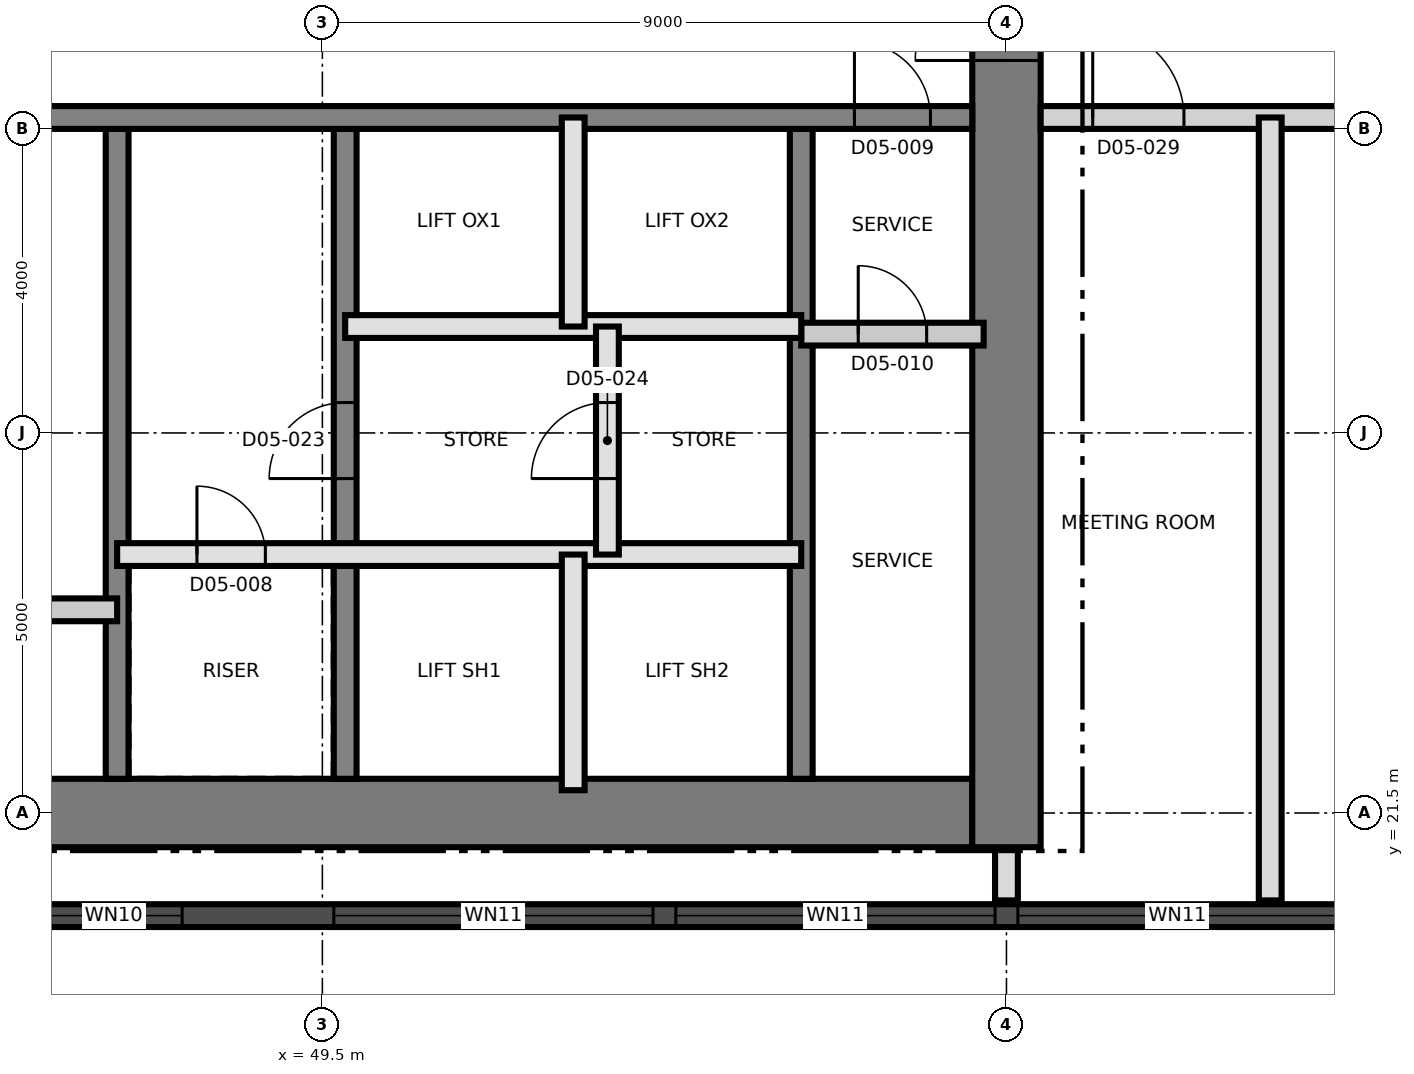
"""IFC4 building model, lengths in metres.
Left out: names, types, materials, properties, quantities, classifications, styles, units other than length and angle.
Written with IfcOpenShell. Run it as: python <this file> out.ifc"""

import sys

from ifc_helpers import new_model, si_unit, direction, frame, frame_2d, origin, place, context, subcontext, project, spatial, rectangle, extrude, element, fill, save


model = new_model("IFC4")
c1 = context("Model", 3, precision=1e-05, world=origin(), true_north=direction((0.0, 1.0)))
c2 = subcontext(c1, "Body", "Model", "MODEL_VIEW")
j1 = project(units=[si_unit("LENGTHUNIT", "METRE"), si_unit("PLANEANGLEUNIT", "RADIAN")], contexts=[c1])
p1 = place(None, origin())
s1 = spatial("IfcSite", under=j1, at=p1, CompositionType="ELEMENT")
p2 = place(p1, origin())
s2 = spatial("IfcBuilding", under=s1, at=p2, CompositionType="ELEMENT")
p3 = place(p2, frame((0.0, 0.0, 70.5)))
s3 = spatial("IfcBuildingStorey", under=s2, at=p3, CompositionType="ELEMENT", Elevation=70.5)
p4 = place(p3, frame((31.05, 21.5, 0.0), z_axis=(0.0, 0.0, 1.0), x_axis=(1.0, 0.0, 0.0)))
e1 = element("IfcWall", 1, at=p4, inside=s3, PredefinedType="SHEAR", context=c2, shape_type="SweptSolid", body=[
    extrude(rectangle(XDim=27.0, YDim=0.9, at=frame_2d((13.5, 0.0))), origin(), (0.0, 0.0, 1.0), 3.7),
])
p5 = place(p3, frame((58.5, 21.05, 0.0), z_axis=(0.0, 0.0, 1.0), x_axis=(0.0, 1.0, 0.0)))
e2 = element("IfcWall", 2, at=p5, inside=s3, PredefinedType="SHEAR", context=c2, shape_type="SweptSolid", body=[
    extrude(rectangle(XDim=18.9, YDim=0.9, at=frame_2d((9.45, 0.0))), origin(), (0.0, 0.0, 1.0), 3.7),
])
p6 = place(p5, frame((10.35, 0.0, 0.0)))
e3 = element("IfcOpeningElement", 3, at=p6, cuts=e2, PredefinedType="OPENING", context=c2, shape_type="SweptSolid", body=[
    extrude(rectangle(XDim=1.2, YDim=2.1, at=frame_2d((0.6, 1.05))), frame((0.0, 0.46, 0.0), z_axis=(0.0, -1.0, 0.0), x_axis=(1.0, 0.0, 0.0)), (0.0, 0.0, 1.0), 0.92),
])
p7 = place(p3, frame((46.8, 21.95, 0.0), z_axis=(0.0, 0.0, 1.0), x_axis=(0.0, 1.0, 0.0)))
e4 = element("IfcWall", 4, at=p7, inside=s3, PredefinedType="SHEAR", context=c2, shape_type="SweptSolid", body=[
    extrude(rectangle(XDim=8.55, YDim=0.3, at=frame_2d((4.275, 0.0))), origin(), (0.0, 0.0, 1.0), 3.7),
])
p8 = place(p3, frame((49.8, 21.95, 0.0), z_axis=(0.0, 0.0, 1.0), x_axis=(0.0, 1.0, 0.0)))
e5 = element("IfcWall", 5, at=p8, inside=s3, PredefinedType="SHEAR", context=c2, shape_type="SweptSolid", body=[
    extrude(rectangle(XDim=8.55, YDim=0.3, at=frame_2d((4.275, 0.0))), origin(), (0.0, 0.0, 1.0), 3.7),
])
p9 = place(p8, frame((3.95, 0.0, 0.0)))
e6 = element("IfcOpeningElement", 6, at=p9, cuts=e5, PredefinedType="OPENING", context=c2, shape_type="SweptSolid", body=[
    extrude(rectangle(XDim=1.0, YDim=2.1, at=frame_2d((0.5, 1.05))), frame((0.0, 0.16, 0.0), z_axis=(0.0, -1.0, 0.0), x_axis=(1.0, 0.0, 0.0)), (0.0, 0.0, 1.0), 0.32),
])
p10 = place(p3, frame((55.8, 21.95, 0.0), z_axis=(0.0, 0.0, 1.0), x_axis=(0.0, 1.0, 0.0)))
e7 = element("IfcWall", 7, at=p10, inside=s3, PredefinedType="SHEAR", context=c2, shape_type="SweptSolid", body=[
    extrude(rectangle(XDim=8.55, YDim=0.3, at=frame_2d((4.275, 0.0))), origin(), (0.0, 0.0, 1.0), 3.7),
])
p11 = place(p3, frame((31.95, 30.65, 0.0), z_axis=(0.0, 0.0, 1.0), x_axis=(1.0, 0.0, 0.0)))
e8 = element("IfcWall", 8, at=p11, inside=s3, PredefinedType="SHEAR", context=c2, shape_type="SweptSolid", body=[
    extrude(rectangle(XDim=26.1, YDim=0.3, at=frame_2d((13.05, 0.0))), origin(), (0.0, 0.0, 1.0), 3.7),
])
p12 = place(p11, frame((24.55, 0.0, 0.0)))
e9 = element("IfcOpeningElement", 9, at=p12, cuts=e8, PredefinedType="OPENING", context=c2, shape_type="SweptSolid", body=[
    extrude(rectangle(XDim=1.0, YDim=2.1, at=frame_2d((0.5, 1.05))), frame((0.0, 0.16, 0.0), z_axis=(0.0, -1.0, 0.0), x_axis=(1.0, 0.0, 0.0)), (0.0, 0.0, 1.0), 0.32),
])
p13 = place(p11, frame((11.35, 0.0, 0.0)))
e10 = element("IfcOpeningElement", 10, at=p13, cuts=e8, PredefinedType="OPENING", context=c2, shape_type="SweptSolid", body=[
    extrude(rectangle(XDim=1.0, YDim=2.1, at=frame_2d((0.5, 1.05))), frame((0.0, 0.16, 0.0), z_axis=(0.0, -1.0, 0.0), x_axis=(1.0, 0.0, 0.0)), (0.0, 0.0, 1.0), 0.32),
])
p14 = place(p3, frame((44.011, 20.15, 0.0), z_axis=(0.0, 0.0, 1.0), x_axis=(1.0, 0.0, 0.0)))
e11 = element("IfcWall", 11, at=p14, inside=s3, PredefinedType="SOLIDWALL", context=c2, shape_type="SweptSolid", body=[
    extrude(rectangle(XDim=43.476, YDim=0.3, at=frame_2d((21.738, 0.0))), origin(), (0.0, 0.0, 1.0), 3.4),
])
p15 = place(p14, frame((1.845, 0.0, 0.3)))
e12 = element("IfcOpeningElement", 12, at=p15, cuts=e11, PredefinedType="OPENING", context=c2, shape_type="SweptSolid", body=[
    extrude(rectangle(XDim=1.8, YDim=2.4, at=frame_2d((0.9, 1.2))), frame((0.0, 0.16, 0.0), z_axis=(0.0, -1.0, 0.0), x_axis=(1.0, 0.0, 0.0)), (0.0, 0.0, 1.0), 0.32),
])
p16 = place(p14, frame((5.639, 0.0, 0.9)))
e13 = element("IfcOpeningElement", 13, at=p16, cuts=e11, PredefinedType="OPENING", context=c2, shape_type="SweptSolid", body=[
    extrude(rectangle(XDim=4.2, YDim=1.5, at=frame_2d((2.1, 0.75))), frame((0.0, 0.16, 0.0), z_axis=(0.0, -1.0, 0.0), x_axis=(1.0, 0.0, 0.0)), (0.0, 0.0, 1.0), 0.32),
])
p17 = place(p14, frame((10.139, 0.0, 0.9)))
e14 = element("IfcOpeningElement", 14, at=p17, cuts=e11, PredefinedType="OPENING", context=c2, shape_type="SweptSolid", body=[
    extrude(rectangle(XDim=4.2, YDim=1.5, at=frame_2d((2.1, 0.75))), frame((0.0, 0.16, 0.0), z_axis=(0.0, -1.0, 0.0), x_axis=(1.0, 0.0, 0.0)), (0.0, 0.0, 1.0), 0.32),
])
p18 = place(p14, frame((14.639, 0.0, 0.9)))
e15 = element("IfcOpeningElement", 15, at=p18, cuts=e11, PredefinedType="OPENING", context=c2, shape_type="SweptSolid", body=[
    extrude(rectangle(XDim=4.2, YDim=1.5, at=frame_2d((2.1, 0.75))), frame((0.0, 0.16, 0.0), z_axis=(0.0, -1.0, 0.0), x_axis=(1.0, 0.0, 0.0)), (0.0, 0.0, 1.0), 0.32),
])
p19 = place(p14, frame((19.139, 0.0, 0.9)))
e16 = element("IfcOpeningElement", 16, at=p19, cuts=e11, PredefinedType="OPENING", context=c2, shape_type="SweptSolid", body=[
    extrude(rectangle(XDim=4.2, YDim=1.5, at=frame_2d((2.1, 0.75))), frame((0.0, 0.16, 0.0), z_axis=(0.0, -1.0, 0.0), x_axis=(1.0, 0.0, 0.0)), (0.0, 0.0, 1.0), 0.32),
])
p20 = place(p14, frame((23.639, 0.0, 0.9)))
e17 = element("IfcOpeningElement", 17, at=p20, cuts=e11, PredefinedType="OPENING", context=c2, shape_type="SweptSolid", body=[
    extrude(rectangle(XDim=4.2, YDim=1.5, at=frame_2d((2.1, 0.75))), frame((0.0, 0.16, 0.0), z_axis=(0.0, -1.0, 0.0), x_axis=(1.0, 0.0, 0.0)), (0.0, 0.0, 1.0), 0.32),
])
p21 = place(p14, frame((28.139, 0.0, 0.9)))
e18 = element("IfcOpeningElement", 18, at=p21, cuts=e11, PredefinedType="OPENING", context=c2, shape_type="SweptSolid", body=[
    extrude(rectangle(XDim=4.2, YDim=1.5, at=frame_2d((2.1, 0.75))), frame((0.0, 0.16, 0.0), z_axis=(0.0, -1.0, 0.0), x_axis=(1.0, 0.0, 0.0)), (0.0, 0.0, 1.0), 0.32),
])
p22 = place(p14, frame((32.639, 0.0, 0.9)))
e19 = element("IfcOpeningElement", 19, at=p22, cuts=e11, PredefinedType="OPENING", context=c2, shape_type="SweptSolid", body=[
    extrude(rectangle(XDim=4.2, YDim=1.5, at=frame_2d((2.1, 0.75))), frame((0.0, 0.16, 0.0), z_axis=(0.0, -1.0, 0.0), x_axis=(1.0, 0.0, 0.0)), (0.0, 0.0, 1.0), 0.32),
])
p23 = place(p14, frame((37.139, 0.0, 0.9)))
e20 = element("IfcOpeningElement", 20, at=p23, cuts=e11, PredefinedType="OPENING", context=c2, shape_type="SweptSolid", body=[
    extrude(rectangle(XDim=4.2, YDim=1.5, at=frame_2d((2.1, 0.75))), frame((0.0, 0.16, 0.0), z_axis=(0.0, -1.0, 0.0), x_axis=(1.0, 0.0, 0.0)), (0.0, 0.0, 1.0), 0.32),
])
p24 = place(p3, frame((40.8, 24.173, 0.0), z_axis=(0.0, 0.0, 1.0), x_axis=(1.0, 0.0, 0.0)))
e21 = element("IfcWall", 21, at=p24, inside=s3, PredefinedType="PARTITIONING", context=c2, shape_type="SweptSolid", body=[
    extrude(rectangle(XDim=6.0, YDim=0.3, at=frame_2d((3.0, 0.0))), origin(), (0.0, 0.0, 1.0), 3.4),
])
p25 = place(p24, frame((2.5, 0.0, 0.0)))
e22 = element("IfcOpeningElement", 22, at=p25, cuts=e21, PredefinedType="OPENING", context=c2, shape_type="SweptSolid", body=[
    extrude(rectangle(XDim=1.0, YDim=2.1, at=frame_2d((0.5, 1.05))), frame((0.0, 0.16, 0.0), z_axis=(0.0, -1.0, 0.0), x_axis=(1.0, 0.0, 0.0)), (0.0, 0.0, 1.0), 0.32),
])
p26 = place(p3, frame((46.8, 24.9, 0.0), z_axis=(0.0, 0.0, 1.0), x_axis=(1.0, 0.0, 0.0)))
e23 = element("IfcWall", 23, at=p26, inside=s3, PredefinedType="SOLIDWALL", context=c2, shape_type="SweptSolid", body=[
    extrude(rectangle(XDim=9.0, YDim=0.3, at=frame_2d((4.5, 0.0))), origin(), (0.0, 0.0, 1.0), 3.4),
])
p27 = place(p26, frame((1.05, 0.0, 0.0)))
e24 = element("IfcOpeningElement", 24, at=p27, cuts=e23, PredefinedType="OPENING", context=c2, shape_type="SweptSolid", body=[
    extrude(rectangle(XDim=0.9, YDim=2.1, at=frame_2d((0.45, 1.05))), frame((0.0, 0.16, 0.0), z_axis=(0.0, -1.0, 0.0), x_axis=(1.0, 0.0, 0.0)), (0.0, 0.0, 1.0), 0.32),
])
p28 = place(p3, frame((55.8, 27.8, 0.0), z_axis=(0.0, 0.0, 1.0), x_axis=(1.0, 0.0, 0.0)))
e25 = element("IfcWall", 25, at=p28, inside=s3, PredefinedType="PARTITIONING", context=c2, shape_type="SweptSolid", body=[
    extrude(rectangle(XDim=2.4, YDim=0.3, at=frame_2d((1.2, 0.0))), origin(), (0.0, 0.0, 1.0), 3.4),
])
p29 = place(p28, frame((0.75, 0.0, 0.0)))
e26 = element("IfcOpeningElement", 26, at=p29, cuts=e25, PredefinedType="OPENING", context=c2, shape_type="SweptSolid", body=[
    extrude(rectangle(XDim=0.9, YDim=2.1, at=frame_2d((0.45, 1.05))), frame((0.0, 0.16, 0.0), z_axis=(0.0, -1.0, 0.0), x_axis=(1.0, 0.0, 0.0)), (0.0, 0.0, 1.0), 0.32),
])
p30 = place(p3, frame((49.8, 27.9, 0.0), z_axis=(0.0, 0.0, 1.0), x_axis=(1.0, 0.0, 0.0)))
e27 = element("IfcWall", 27, at=p30, inside=s3, PredefinedType="SOLIDWALL", context=c2, shape_type="SweptSolid", body=[
    extrude(rectangle(XDim=6.0, YDim=0.3, at=frame_2d((3.0, 0.0))), origin(), (0.0, 0.0, 1.0), 3.4),
])
p31 = place(p3, frame((52.8, 21.8, 0.0), z_axis=(0.0, 0.0, 1.0), x_axis=(0.0, 1.0, 0.0)))
e28 = element("IfcWall", 28, at=p31, inside=s3, PredefinedType="SOLIDWALL", context=c2, shape_type="SweptSolid", body=[
    extrude(rectangle(XDim=3.1, YDim=0.3, at=frame_2d((1.55, 0.0))), origin(), (0.0, 0.0, 1.0), 3.4),
])
p32 = place(p3, frame((52.8, 27.9, 0.0), z_axis=(0.0, 0.0, 1.0), x_axis=(0.0, 1.0, 0.0)))
e29 = element("IfcWall", 29, at=p32, inside=s3, PredefinedType="SOLIDWALL", context=c2, shape_type="SweptSolid", body=[
    extrude(rectangle(XDim=2.75, YDim=0.3, at=frame_2d((1.375, 0.0))), origin(), (0.0, 0.0, 1.0), 3.4),
])
p33 = place(p3, frame((53.25, 24.9, 0.0), z_axis=(0.0, 0.0, 1.0), x_axis=(0.0, 1.0, 0.0)))
e30 = element("IfcWall", 30, at=p33, inside=s3, PredefinedType="SOLIDWALL", context=c2, shape_type="SweptSolid", body=[
    extrude(rectangle(XDim=3.0, YDim=0.3, at=frame_2d((1.5, 0.0))), origin(), (0.0, 0.0, 1.0), 3.4),
])
p34 = place(p33, frame((1.0, 0.0, 0.0)))
e31 = element("IfcOpeningElement", 31, at=p34, cuts=e30, PredefinedType="OPENING", context=c2, shape_type="SweptSolid", body=[
    extrude(rectangle(XDim=1.0, YDim=2.1, at=frame_2d((0.5, 1.05))), frame((0.0, 0.16, 0.0), z_axis=(0.0, -1.0, 0.0), x_axis=(1.0, 0.0, 0.0)), (0.0, 0.0, 1.0), 0.32),
])
p35 = place(p3, frame((58.95, 30.65, 0.0), z_axis=(0.0, 0.0, 1.0), x_axis=(1.0, 0.0, 0.0)))
e32 = element("IfcWall", 32, at=p35, inside=s3, PredefinedType="PARTITIONING", context=c2, shape_type="SweptSolid", body=[
    extrude(rectangle(XDim=26.38, YDim=0.3, at=frame_2d((13.19, 0.0))), origin(), (0.0, 0.0, 1.0), 3.4),
])
p36 = place(p35, frame((0.685, 0.0, 0.0)))
e33 = element("IfcOpeningElement", 33, at=p36, cuts=e32, PredefinedType="OPENING", context=c2, shape_type="SweptSolid", body=[
    extrude(rectangle(XDim=1.2, YDim=2.1, at=frame_2d((0.6, 1.05))), frame((0.0, 0.16, 0.0), z_axis=(0.0, -1.0, 0.0), x_axis=(1.0, 0.0, 0.0)), (0.0, 0.0, 1.0), 0.32),
])
p37 = place(p35, frame((3.935, 0.0, 0.0)))
e34 = element("IfcOpeningElement", 34, at=p37, cuts=e32, PredefinedType="OPENING", context=c2, shape_type="SweptSolid", body=[
    extrude(rectangle(XDim=1.0, YDim=2.1, at=frame_2d((0.5, 1.05))), frame((0.0, 0.16, 0.0), z_axis=(0.0, -1.0, 0.0), x_axis=(1.0, 0.0, 0.0)), (0.0, 0.0, 1.0), 0.32),
])
p38 = place(p35, frame((11.965, 0.0, 0.0)))
e35 = element("IfcOpeningElement", 35, at=p38, cuts=e32, PredefinedType="OPENING", context=c2, shape_type="SweptSolid", body=[
    extrude(rectangle(XDim=1.0, YDim=2.1, at=frame_2d((0.5, 1.05))), frame((0.0, 0.16, 0.0), z_axis=(0.0, -1.0, 0.0), x_axis=(1.0, 0.0, 0.0)), (0.0, 0.0, 1.0), 0.32),
])
p39 = place(p35, frame((14.915, 0.0, 0.0)))
e36 = element("IfcOpeningElement", 36, at=p39, cuts=e32, PredefinedType="OPENING", context=c2, shape_type="SweptSolid", body=[
    extrude(rectangle(XDim=1.4, YDim=2.1, at=frame_2d((0.7, 1.05))), frame((0.0, 0.16, 0.0), z_axis=(0.0, -1.0, 0.0), x_axis=(1.0, 0.0, 0.0)), (0.0, 0.0, 1.0), 0.32),
])
p40 = place(p35, frame((18.685, 0.0, 0.0)))
e37 = element("IfcOpeningElement", 37, at=p40, cuts=e32, PredefinedType="OPENING", context=c2, shape_type="SweptSolid", body=[
    extrude(rectangle(XDim=1.2, YDim=2.1, at=frame_2d((0.6, 1.05))), frame((0.0, 0.16, 0.0), z_axis=(0.0, -1.0, 0.0), x_axis=(1.0, 0.0, 0.0)), (0.0, 0.0, 1.0), 0.32),
])
p41 = place(p35, frame((21.935, 0.0, 0.0)))
e38 = element("IfcOpeningElement", 38, at=p41, cuts=e32, PredefinedType="OPENING", context=c2, shape_type="SweptSolid", body=[
    extrude(rectangle(XDim=1.0, YDim=2.1, at=frame_2d((0.5, 1.05))), frame((0.0, 0.16, 0.0), z_axis=(0.0, -1.0, 0.0), x_axis=(1.0, 0.0, 0.0)), (0.0, 0.0, 1.0), 0.32),
])
p42 = place(p3, frame((58.5, 20.35, 0.0), z_axis=(0.0, 0.0, 1.0), x_axis=(0.0, 1.0, 0.0)))
e39 = element("IfcWall", 39, at=p42, inside=s3, PredefinedType="PARTITIONING", context=c2, shape_type="SweptSolid", body=[
    extrude(rectangle(XDim=0.68, YDim=0.3, at=frame_2d((0.34, 0.0))), origin(), (0.0, 0.0, 1.0), 3.4),
])
p43 = place(p3, frame((61.97, 20.35, 0.0), z_axis=(0.0, 0.0, 1.0), x_axis=(0.0, 1.0, 0.0)))
e40 = element("IfcWall", 40, at=p43, inside=s3, PredefinedType="PARTITIONING", context=c2, shape_type="SweptSolid", body=[
    extrude(rectangle(XDim=10.3, YDim=0.3, at=frame_2d((5.15, 0.0))), origin(), (0.0, 0.0, 1.0), 3.4),
])
p44 = place(p15, origin())
e41 = element("IfcWindow", 41, at=p44, inside=s3, PartitioningType="SINGLE_PANEL", PredefinedType="WINDOW", context=c2, shape_type="SweptSolid", body=[
    extrude(rectangle(XDim=1.8, YDim=2.4, at=frame_2d((0.9, 1.2))), frame((0.0, 0.03, 0.0), z_axis=(0.0, -1.0, 0.0), x_axis=(1.0, 0.0, 0.0)), (0.0, 0.0, 1.0), 0.06),
])
fill(e12, e41)
p45 = place(p16, origin())
e42 = element("IfcWindow", 42, at=p45, inside=s3, PartitioningType="SINGLE_PANEL", PredefinedType="WINDOW", context=c2, shape_type="SweptSolid", body=[
    extrude(rectangle(XDim=4.2, YDim=1.5, at=frame_2d((2.1, 0.75))), frame((0.0, 0.03, 0.0), z_axis=(0.0, -1.0, 0.0), x_axis=(1.0, 0.0, 0.0)), (0.0, 0.0, 1.0), 0.06),
])
fill(e13, e42)
p46 = place(p17, origin())
e43 = element("IfcWindow", 43, at=p46, inside=s3, PartitioningType="SINGLE_PANEL", PredefinedType="WINDOW", context=c2, shape_type="SweptSolid", body=[
    extrude(rectangle(XDim=4.2, YDim=1.5, at=frame_2d((2.1, 0.75))), frame((0.0, 0.03, 0.0), z_axis=(0.0, -1.0, 0.0), x_axis=(1.0, 0.0, 0.0)), (0.0, 0.0, 1.0), 0.06),
])
fill(e14, e43)
p47 = place(p18, origin())
e44 = element("IfcWindow", 44, at=p47, inside=s3, PartitioningType="SINGLE_PANEL", PredefinedType="WINDOW", context=c2, shape_type="SweptSolid", body=[
    extrude(rectangle(XDim=4.2, YDim=1.5, at=frame_2d((2.1, 0.75))), frame((0.0, 0.03, 0.0), z_axis=(0.0, -1.0, 0.0), x_axis=(1.0, 0.0, 0.0)), (0.0, 0.0, 1.0), 0.06),
])
fill(e15, e44)
p48 = place(p27, origin())
e45 = element("IfcDoor", 45, at=p48, inside=s3, OperationType="SINGLE_SWING_RIGHT", PredefinedType="DOOR", context=c2, shape_type="SweptSolid", body=[
    extrude(rectangle(XDim=0.9, YDim=2.1, at=frame_2d((0.45, 1.05))), frame((0.0, 0.025, 0.0), z_axis=(0.0, -1.0, 0.0), x_axis=(1.0, 0.0, 0.0)), (0.0, 0.0, 1.0), 0.05),
])
fill(e24, e45)
p49 = place(p12, origin())
e46 = element("IfcDoor", 46, at=p49, inside=s3, OperationType="SINGLE_SWING_LEFT", PredefinedType="DOOR", context=c2, shape_type="SweptSolid", body=[
    extrude(rectangle(XDim=1.0, YDim=2.1, at=frame_2d((0.5, 1.05))), frame((0.0, 0.025, 0.0), z_axis=(0.0, -1.0, 0.0), x_axis=(1.0, 0.0, 0.0)), (0.0, 0.0, 1.0), 0.05),
])
fill(e9, e46)
p50 = place(p29, origin())
e47 = element("IfcDoor", 47, at=p50, inside=s3, OperationType="SINGLE_SWING_RIGHT", PredefinedType="DOOR", context=c2, shape_type="SweptSolid", body=[
    extrude(rectangle(XDim=0.9, YDim=2.1, at=frame_2d((0.45, 1.05))), frame((0.0, 0.025, 0.0), z_axis=(0.0, -1.0, 0.0), x_axis=(1.0, 0.0, 0.0)), (0.0, 0.0, 1.0), 0.05),
])
fill(e26, e47)
p51 = place(p6, origin())
e48 = element("IfcDoor", 48, at=p51, inside=s3, OperationType="SINGLE_SWING_LEFT", PredefinedType="DOOR", context=c2, shape_type="SweptSolid", body=[
    extrude(rectangle(XDim=1.2, YDim=2.1, at=frame_2d((0.6, 1.05))), frame((0.0, 0.025, 0.0), z_axis=(0.0, -1.0, 0.0), x_axis=(1.0, 0.0, 0.0)), (0.0, 0.0, 1.0), 0.05),
])
fill(e3, e48)
p52 = place(p9, origin())
e49 = element("IfcDoor", 49, at=p52, inside=s3, OperationType="SINGLE_SWING_LEFT", PredefinedType="DOOR", context=c2, shape_type="SweptSolid", body=[
    extrude(rectangle(XDim=1.0, YDim=2.1, at=frame_2d((0.5, 1.05))), frame((0.0, 0.025, 0.0), z_axis=(0.0, -1.0, 0.0), x_axis=(1.0, 0.0, 0.0)), (0.0, 0.0, 1.0), 0.05),
])
fill(e6, e49)
p53 = place(p34, origin())
e50 = element("IfcDoor", 50, at=p53, inside=s3, OperationType="SINGLE_SWING_RIGHT", PredefinedType="DOOR", context=c2, shape_type="SweptSolid", body=[
    extrude(rectangle(XDim=1.0, YDim=2.1, at=frame_2d((0.5, 1.05))), frame((0.0, 0.025, 0.0), z_axis=(0.0, -1.0, 0.0), x_axis=(1.0, 0.0, 0.0)), (0.0, 0.0, 1.0), 0.05),
])
fill(e31, e50)
p54 = place(p36, origin())
e51 = element("IfcDoor", 51, at=p54, inside=s3, OperationType="SINGLE_SWING_LEFT", PredefinedType="DOOR", context=c2, shape_type="SweptSolid", body=[
    extrude(rectangle(XDim=1.2, YDim=2.1, at=frame_2d((0.6, 1.05))), frame((0.0, 0.025, 0.0), z_axis=(0.0, -1.0, 0.0), x_axis=(1.0, 0.0, 0.0)), (0.0, 0.0, 1.0), 0.05),
])
fill(e33, e51)
save(model, sys.argv[1])
